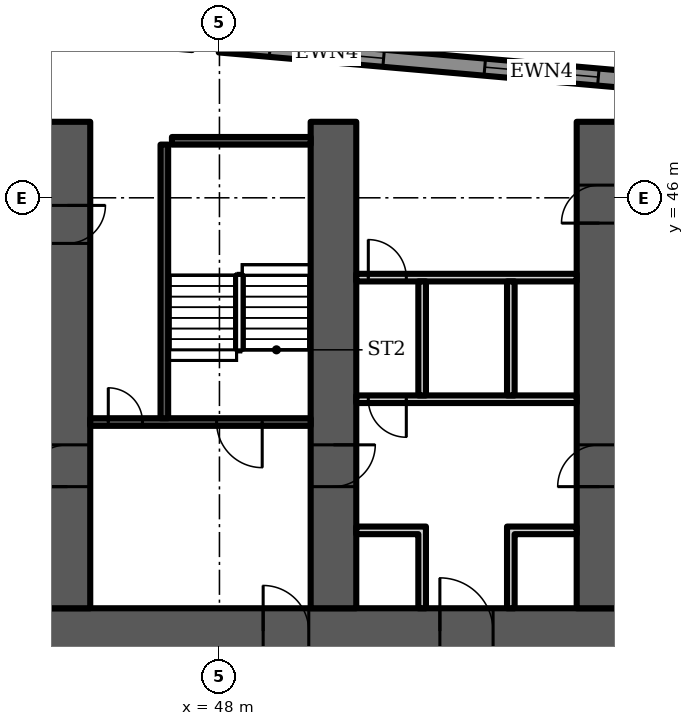
"""IFC4 building model, lengths in metres.
Left out: names, types, materials, properties, quantities, classifications, styles, units other than length and angle.
Written with IfcOpenShell. Run it as: python <this file> out.ifc"""

import sys

from ifc_helpers import new_model, si_unit, direction, frame, frame_2d, origin, place, context, subcontext, project, spatial, polyline, rectangle, outline, extrude, element, fill, save


model = new_model("IFC4")
c1 = context("Model", 3, precision=1e-05, world=origin(), true_north=direction((0.0, 1.0)))
c2 = subcontext(c1, "Body", "Model", "MODEL_VIEW")
j1 = project(units=[si_unit("LENGTHUNIT", "METRE"), si_unit("PLANEANGLEUNIT", "RADIAN")], contexts=[c1])
p1 = place(None, origin())
s1 = spatial("IfcSite", under=j1, at=p1, CompositionType="ELEMENT")
p2 = place(p1, origin())
s2 = spatial("IfcBuilding", under=s1, at=p2, CompositionType="ELEMENT")
p3 = place(p2, frame((0.0, 0.0, 27.5)))
s3 = spatial("IfcBuildingStorey", under=s2, at=p3, CompositionType="ELEMENT", Elevation=27.5)
p4 = place(p3, frame((59.301, 49.06, 0.0), z_axis=(0.0, 0.0, 1.0), x_axis=(-0.996195, 0.087145, 0.0)))
e1 = element("IfcWall", 1, at=p4, inside=s3, PredefinedType="SOLIDWALL", context=c2, shape_type="SweptSolid", body=[
    extrude(rectangle(XDim=11.344, YDim=0.45, at=frame_2d((5.672, 0.0))), origin(), (0.0, 0.0, 1.0), 5.2),
])
p5 = place(p4, frame((1.336, 0.0, 1.0)))
e2 = element("IfcOpeningElement", 2, at=p5, cuts=e1, PredefinedType="OPENING", context=c2, shape_type="SweptSolid", body=[
    extrude(rectangle(XDim=3.0, YDim=3.2, at=frame_2d((1.5, 1.6))), frame((0.0, 0.235, 0.0), z_axis=(0.0, -1.0, 0.0), x_axis=(1.0, 0.0, 0.0)), (0.0, 0.0, 1.0), 0.47),
])
p6 = place(p4, frame((7.008, 0.0, 1.0)))
e3 = element("IfcOpeningElement", 3, at=p6, cuts=e1, PredefinedType="OPENING", context=c2, shape_type="SweptSolid", body=[
    extrude(rectangle(XDim=3.0, YDim=3.2, at=frame_2d((1.5, 1.6))), frame((0.0, 0.235, 0.0), z_axis=(0.0, -1.0, 0.0), x_axis=(1.0, 0.0, 0.0)), (0.0, 0.0, 1.0), 0.47),
])
p7 = place(p3, frame((9.0, 34.6, 0.0), z_axis=(0.0, 0.0, 1.0), x_axis=(1.0, 0.0, 0.0)))
e4 = element("IfcWall", 4, at=p7, inside=s3, PredefinedType="SHEAR", context=c2, shape_type="SweptSolid", body=[
    extrude(rectangle(XDim=56.0, YDim=1.2, at=frame_2d((28.0, 0.0))), origin(), (0.0, 0.0, 1.0), 5.2),
])
p8 = place(p7, frame((3.3, 0.0, 0.0)))
e5 = element("IfcOpeningElement", 5, at=p8, cuts=e4, PredefinedType="OPENING", context=c2, shape_type="SweptSolid", body=[
    extrude(rectangle(XDim=1.0, YDim=2.1, at=frame_2d((0.5, 1.05))), frame((0.0, 0.61, 0.0), z_axis=(0.0, -1.0, 0.0), x_axis=(1.0, 0.0, 0.0)), (0.0, 0.0, 1.0), 1.22),
])
p9 = place(p7, frame((7.867, 0.0, 0.0)))
e6 = element("IfcOpeningElement", 6, at=p9, cuts=e4, PredefinedType="OPENING", context=c2, shape_type="SweptSolid", body=[
    extrude(rectangle(XDim=1.1, YDim=2.1, at=frame_2d((0.55, 1.05))), frame((0.0, 0.61, 0.0), z_axis=(0.0, -1.0, 0.0), x_axis=(1.0, 0.0, 0.0)), (0.0, 0.0, 1.0), 1.22),
])
p10 = place(p7, frame((12.033, 0.0, 0.0)))
e7 = element("IfcOpeningElement", 7, at=p10, cuts=e4, PredefinedType="OPENING", context=c2, shape_type="SweptSolid", body=[
    extrude(rectangle(XDim=1.1, YDim=2.1, at=frame_2d((0.55, 1.05))), frame((0.0, 0.61, 0.0), z_axis=(0.0, -1.0, 0.0), x_axis=(1.0, 0.0, 0.0)), (0.0, 0.0, 1.0), 1.22),
])
p11 = place(p7, frame((9.8, 0.0, 0.0)))
e8 = element("IfcOpeningElement", 8, at=p11, cuts=e4, PredefinedType="OPENING", context=c2, shape_type="SweptSolid", body=[
    extrude(rectangle(XDim=1.4, YDim=2.1, at=frame_2d((0.7, 1.05))), frame((0.0, 0.61, 0.0), z_axis=(0.0, -1.0, 0.0), x_axis=(1.0, 0.0, 0.0)), (0.0, 0.0, 1.0), 1.22),
])
p12 = place(p7, frame((14.65, 0.0, 0.0)))
e9 = element("IfcOpeningElement", 9, at=p12, cuts=e4, PredefinedType="OPENING", context=c2, shape_type="SweptSolid", body=[
    extrude(rectangle(XDim=1.2, YDim=2.1, at=frame_2d((0.6, 1.05))), frame((0.0, 0.61, 0.0), z_axis=(0.0, -1.0, 0.0), x_axis=(1.0, 0.0, 0.0)), (0.0, 0.0, 1.0), 1.22),
])
p13 = place(p7, frame((21.867, 0.0, 0.0)))
e10 = element("IfcOpeningElement", 10, at=p13, cuts=e4, PredefinedType="OPENING", context=c2, shape_type="SweptSolid", body=[
    extrude(rectangle(XDim=1.1, YDim=2.1, at=frame_2d((0.55, 1.05))), frame((0.0, 0.61, 0.0), z_axis=(0.0, -1.0, 0.0), x_axis=(1.0, 0.0, 0.0)), (0.0, 0.0, 1.0), 1.22),
])
p14 = place(p7, frame((26.033, 0.0, 0.0)))
e11 = element("IfcOpeningElement", 11, at=p14, cuts=e4, PredefinedType="OPENING", context=c2, shape_type="SweptSolid", body=[
    extrude(rectangle(XDim=1.1, YDim=2.1, at=frame_2d((0.55, 1.05))), frame((0.0, 0.61, 0.0), z_axis=(0.0, -1.0, 0.0), x_axis=(1.0, 0.0, 0.0)), (0.0, 0.0, 1.0), 1.22),
])
p15 = place(p7, frame((23.8, 0.0, 0.0)))
e12 = element("IfcOpeningElement", 12, at=p15, cuts=e4, PredefinedType="OPENING", context=c2, shape_type="SweptSolid", body=[
    extrude(rectangle(XDim=1.4, YDim=2.1, at=frame_2d((0.7, 1.05))), frame((0.0, 0.61, 0.0), z_axis=(0.0, -1.0, 0.0), x_axis=(1.0, 0.0, 0.0)), (0.0, 0.0, 1.0), 1.22),
])
p16 = place(p7, frame((28.867, 0.0, 0.0)))
e13 = element("IfcOpeningElement", 13, at=p16, cuts=e4, PredefinedType="OPENING", context=c2, shape_type="SweptSolid", body=[
    extrude(rectangle(XDim=1.1, YDim=2.1, at=frame_2d((0.55, 1.05))), frame((0.0, 0.61, 0.0), z_axis=(0.0, -1.0, 0.0), x_axis=(1.0, 0.0, 0.0)), (0.0, 0.0, 1.0), 1.22),
])
p17 = place(p7, frame((33.033, 0.0, 0.0)))
e14 = element("IfcOpeningElement", 14, at=p17, cuts=e4, PredefinedType="OPENING", context=c2, shape_type="SweptSolid", body=[
    extrude(rectangle(XDim=1.1, YDim=2.1, at=frame_2d((0.55, 1.05))), frame((0.0, 0.61, 0.0), z_axis=(0.0, -1.0, 0.0), x_axis=(1.0, 0.0, 0.0)), (0.0, 0.0, 1.0), 1.22),
])
p18 = place(p7, frame((40.15, 0.0, 0.0)))
e15 = element("IfcOpeningElement", 15, at=p18, cuts=e4, PredefinedType="OPENING", context=c2, shape_type="SweptSolid", body=[
    extrude(rectangle(XDim=1.2, YDim=2.1, at=frame_2d((0.6, 1.05))), frame((0.0, 0.61, 0.0), z_axis=(0.0, -1.0, 0.0), x_axis=(1.0, 0.0, 0.0)), (0.0, 0.0, 1.0), 1.22),
])
p19 = place(p7, frame((44.8, 0.0, 0.0)))
e16 = element("IfcOpeningElement", 16, at=p19, cuts=e4, PredefinedType="OPENING", context=c2, shape_type="SweptSolid", body=[
    extrude(rectangle(XDim=1.4, YDim=2.1, at=frame_2d((0.7, 1.05))), frame((0.0, 0.61, 0.0), z_axis=(0.0, -1.0, 0.0), x_axis=(1.0, 0.0, 0.0)), (0.0, 0.0, 1.0), 1.22),
])
p20 = place(p7, frame((49.867, 0.0, 0.0)))
e17 = element("IfcOpeningElement", 17, at=p20, cuts=e4, PredefinedType="OPENING", context=c2, shape_type="SweptSolid", body=[
    extrude(rectangle(XDim=1.1, YDim=2.1, at=frame_2d((0.55, 1.05))), frame((0.0, 0.61, 0.0), z_axis=(0.0, -1.0, 0.0), x_axis=(1.0, 0.0, 0.0)), (0.0, 0.0, 1.0), 1.22),
])
p21 = place(p7, frame((53.5, 0.0, 0.0)))
e18 = element("IfcOpeningElement", 18, at=p21, cuts=e4, PredefinedType="OPENING", context=c2, shape_type="SweptSolid", body=[
    extrude(rectangle(XDim=1.1, YDim=2.1, at=frame_2d((0.55, 1.05))), frame((0.0, 0.61, 0.0), z_axis=(0.0, -1.0, 0.0), x_axis=(1.0, 0.0, 0.0)), (0.0, 0.0, 1.0), 1.22),
])
p22 = place(p7, frame((51.567, 0.0, 0.0)))
e19 = element("IfcOpeningElement", 19, at=p22, cuts=e4, PredefinedType="OPENING", context=c2, shape_type="SweptSolid", body=[
    extrude(rectangle(XDim=1.4, YDim=2.1, at=frame_2d((0.7, 1.05))), frame((0.0, 0.61, 0.0), z_axis=(0.0, -1.0, 0.0), x_axis=(1.0, 0.0, 0.0)), (0.0, 0.0, 1.0), 1.22),
])
p23 = place(p3, frame((44.0, 35.2, 0.0), z_axis=(0.0, 0.0, 1.0), x_axis=(0.0, 1.0, 0.0)))
e20 = element("IfcWall", 20, at=p23, inside=s3, PredefinedType="SHEAR", context=c2, shape_type="SweptSolid", body=[
    extrude(rectangle(XDim=12.8, YDim=1.2, at=frame_2d((6.4, 0.0))), origin(), (0.0, 0.0, 1.0), 5.2),
])
p24 = place(p23, frame((3.2, 0.0, 0.0)))
e21 = element("IfcOpeningElement", 21, at=p24, cuts=e20, PredefinedType="OPENING", context=c2, shape_type="SweptSolid", body=[
    extrude(rectangle(XDim=1.1, YDim=2.1, at=frame_2d((0.55, 1.05))), frame((0.0, 0.61, 0.0), z_axis=(0.0, -1.0, 0.0), x_axis=(1.0, 0.0, 0.0)), (0.0, 0.0, 1.0), 1.22),
])
p25 = place(p23, frame((9.6, 0.0, 0.0)))
e22 = element("IfcOpeningElement", 22, at=p25, cuts=e20, PredefinedType="OPENING", context=c2, shape_type="SweptSolid", body=[
    extrude(rectangle(XDim=1.0, YDim=2.1, at=frame_2d((0.5, 1.05))), frame((0.0, 0.61, 0.0), z_axis=(0.0, -1.0, 0.0), x_axis=(1.0, 0.0, 0.0)), (0.0, 0.0, 1.0), 1.22),
])
p26 = place(p3, frame((51.0, 35.2, 0.0), z_axis=(0.0, 0.0, 1.0), x_axis=(0.0, 1.0, 0.0)))
e23 = element("IfcWall", 23, at=p26, inside=s3, PredefinedType="SHEAR", context=c2, shape_type="SweptSolid", body=[
    extrude(rectangle(XDim=12.8, YDim=1.2, at=frame_2d((6.4, 0.0))), origin(), (0.0, 0.0, 1.0), 5.2),
])
p27 = place(p26, frame((3.2, 0.0, 0.0)))
e24 = element("IfcOpeningElement", 24, at=p27, cuts=e23, PredefinedType="OPENING", context=c2, shape_type="SweptSolid", body=[
    extrude(rectangle(XDim=1.1, YDim=2.1, at=frame_2d((0.55, 1.05))), frame((0.0, 0.61, 0.0), z_axis=(0.0, -1.0, 0.0), x_axis=(1.0, 0.0, 0.0)), (0.0, 0.0, 1.0), 1.22),
])
p28 = place(p3, frame((58.0, 35.2, 0.0), z_axis=(0.0, 0.0, 1.0), x_axis=(0.0, 1.0, 0.0)))
e25 = element("IfcWall", 25, at=p28, inside=s3, PredefinedType="SHEAR", context=c2, shape_type="SweptSolid", body=[
    extrude(rectangle(XDim=12.8, YDim=1.2, at=frame_2d((6.4, 0.0))), origin(), (0.0, 0.0, 1.0), 5.2),
])
p29 = place(p28, frame((10.134, 0.0, 0.0)))
e26 = element("IfcOpeningElement", 26, at=p29, cuts=e25, PredefinedType="OPENING", context=c2, shape_type="SweptSolid", body=[
    extrude(rectangle(XDim=1.0, YDim=2.1, at=frame_2d((0.5, 1.05))), frame((0.0, 0.61, 0.0), z_axis=(0.0, -1.0, 0.0), x_axis=(1.0, 0.0, 0.0)), (0.0, 0.0, 1.0), 1.22),
])
p30 = place(p28, frame((3.2, 0.0, 0.0)))
e27 = element("IfcOpeningElement", 27, at=p30, cuts=e25, PredefinedType="OPENING", context=c2, shape_type="SweptSolid", body=[
    extrude(rectangle(XDim=1.1, YDim=2.1, at=frame_2d((0.55, 1.05))), frame((0.0, 0.61, 0.0), z_axis=(0.0, -1.0, 0.0), x_axis=(1.0, 0.0, 0.0)), (0.0, 0.0, 1.0), 1.22),
])
p31 = place(p3, frame((44.6, 40.1, 0.0), z_axis=(0.0, 0.0, 1.0), x_axis=(1.0, 0.0, 0.0)))
e28 = element("IfcWall", 28, at=p31, inside=s3, PredefinedType="SHEAR", context=c2, shape_type="SweptSolid", body=[
    extrude(rectangle(XDim=5.8, YDim=0.2, at=frame_2d((2.9, 0.0))), origin(), (0.0, 0.0, 1.0), 5.2),
])
p32 = place(p31, frame((3.325, 0.0, 0.0)))
e29 = element("IfcOpeningElement", 29, at=p32, cuts=e28, PredefinedType="OPENING", context=c2, shape_type="SweptSolid", body=[
    extrude(rectangle(XDim=1.2, YDim=2.1, at=frame_2d((0.6, 1.05))), frame((0.0, 0.11, 0.0), z_axis=(0.0, -1.0, 0.0), x_axis=(1.0, 0.0, 0.0)), (0.0, 0.0, 1.0), 0.22),
])
p33 = place(p31, frame((0.475, 0.0, 0.0)))
e30 = element("IfcOpeningElement", 30, at=p33, cuts=e28, PredefinedType="OPENING", context=c2, shape_type="SweptSolid", body=[
    extrude(rectangle(XDim=0.9, YDim=2.1, at=frame_2d((0.45, 1.05))), frame((0.0, 0.11, 0.0), z_axis=(0.0, -1.0, 0.0), x_axis=(1.0, 0.0, 0.0)), (0.0, 0.0, 1.0), 0.22),
])
p34 = place(p3, frame((46.55, 40.2, 0.0), z_axis=(0.0, 0.0, 1.0), x_axis=(0.0, 1.0, 0.0)))
e31 = element("IfcWall", 31, at=p34, inside=s3, PredefinedType="SHEAR", context=c2, shape_type="SweptSolid", body=[
    extrude(rectangle(XDim=7.2, YDim=0.2, at=frame_2d((3.6, 0.0))), origin(), (0.0, 0.0, 1.0), 5.2),
])
p35 = place(p3, frame((46.75, 47.5, 0.0), z_axis=(0.0, 0.0, 1.0), x_axis=(1.0, 0.0, 0.0)))
e32 = element("IfcWall", 32, at=p35, inside=s3, PredefinedType="SHEAR", context=c2, shape_type="SweptSolid", body=[
    extrude(rectangle(XDim=3.65, YDim=0.2, at=frame_2d((1.825, 0.0))), origin(), (0.0, 0.0, 1.0), 5.2),
])
p36 = place(p3, frame((51.6, 40.7, 0.0), z_axis=(0.0, 0.0, 1.0), x_axis=(1.0, 0.0, 0.0)))
e33 = element("IfcWall", 33, at=p36, inside=s3, PredefinedType="PARTITIONING", context=c2, shape_type="SweptSolid", body=[
    extrude(rectangle(XDim=5.8, YDim=0.2, at=frame_2d((2.9, 0.0))), origin(), (0.0, 0.0, 1.0), 5.2),
])
p37 = place(p36, frame((0.317, 0.0, 0.0)))
e34 = element("IfcOpeningElement", 34, at=p37, cuts=e33, PredefinedType="OPENING", context=c2, shape_type="SweptSolid", body=[
    extrude(rectangle(XDim=1.0, YDim=2.1, at=frame_2d((0.5, 1.05))), frame((0.0, 0.11, 0.0), z_axis=(0.0, -1.0, 0.0), x_axis=(1.0, 0.0, 0.0)), (0.0, 0.0, 1.0), 0.22),
])
p38 = place(p3, frame((51.6, 43.9, 0.0), z_axis=(0.0, 0.0, 1.0), x_axis=(1.0, 0.0, 0.0)))
e35 = element("IfcWall", 35, at=p38, inside=s3, PredefinedType="PARTITIONING", context=c2, shape_type="SweptSolid", body=[
    extrude(rectangle(XDim=5.8, YDim=0.2, at=frame_2d((2.9, 0.0))), origin(), (0.0, 0.0, 1.0), 5.2),
])
p39 = place(p38, frame((0.317, 0.0, 0.0)))
e36 = element("IfcOpeningElement", 36, at=p39, cuts=e35, PredefinedType="OPENING", context=c2, shape_type="SweptSolid", body=[
    extrude(rectangle(XDim=1.0, YDim=2.1, at=frame_2d((0.5, 1.05))), frame((0.0, 0.11, 0.0), z_axis=(0.0, -1.0, 0.0), x_axis=(1.0, 0.0, 0.0)), (0.0, 0.0, 1.0), 0.22),
])
p40 = place(p3, frame((0.0, 0.0, -0.0)))
e37 = element("IfcWall", 37, at=p40, inside=s3, PredefinedType="PARTITIONING", context=c2, shape_type="SweptSolid", body=[
    extrude(outline(polyline([(53.233, 37.15), (51.6, 37.15), (51.6, 37.35), (53.233, 37.35), (53.433, 37.35), (53.433, 35.2), (53.233, 35.2), (53.233, 37.15)])), origin(), (0.0, 0.0, 1.0), 5.2),
])
p41 = place(p3, frame((0.0, 0.0, -0.0)))
e38 = element("IfcWall", 38, at=p41, inside=s3, PredefinedType="PARTITIONING", context=c2, shape_type="SweptSolid", body=[
    extrude(outline(polyline([(55.567, 37.35), (55.767, 37.35), (57.4, 37.35), (57.4, 37.15), (55.767, 37.15), (55.767, 35.2), (55.567, 35.2), (55.567, 37.35)])), origin(), (0.0, 0.0, 1.0), 5.2),
])
p42 = place(p3, frame((0.0, 0.0, -0.0)))
e39 = element("IfcWall", 39, at=p42, inside=s3, PredefinedType="PARTITIONING", context=c2, shape_type="SweptSolid", body=[
    extrude(outline(polyline([(53.233, 40.8), (53.233, 43.8), (53.433, 43.8), (53.433, 40.8), (53.233, 40.8)])), origin(), (0.0, 0.0, 1.0), 5.2),
])
p43 = place(p3, frame((0.0, 0.0, -0.0)))
e40 = element("IfcWall", 40, at=p43, inside=s3, PredefinedType="PARTITIONING", context=c2, shape_type="SweptSolid", body=[
    extrude(outline(polyline([(55.567, 40.8), (55.567, 43.8), (55.767, 43.8), (55.767, 40.8), (55.567, 40.8)])), origin(), (0.0, 0.0, 1.0), 5.2),
])
p44 = place(p5, origin())
e41 = element("IfcWindow", 41, at=p44, inside=s3, PartitioningType="SINGLE_PANEL", PredefinedType="WINDOW", context=c2, shape_type="SweptSolid", body=[
    extrude(rectangle(XDim=3.0, YDim=3.2, at=frame_2d((1.5, 1.6))), frame((0.0, 0.105, 0.0), z_axis=(0.0, -1.0, 0.0), x_axis=(1.0, 0.0, 0.0)), (0.0, 0.0, 1.0), 0.06),
])
fill(e2, e41)
p45 = place(p6, origin())
e42 = element("IfcWindow", 42, at=p45, inside=s3, PartitioningType="SINGLE_PANEL", PredefinedType="WINDOW", context=c2, shape_type="SweptSolid", body=[
    extrude(rectangle(XDim=3.0, YDim=3.2, at=frame_2d((1.5, 1.6))), frame((0.0, 0.105, 0.0), z_axis=(0.0, -1.0, 0.0), x_axis=(1.0, 0.0, 0.0)), (0.0, 0.0, 1.0), 0.06),
])
fill(e3, e42)
p46 = place(p32, origin())
e43 = element("IfcDoor", 43, at=p46, inside=s3, OperationType="SINGLE_SWING_RIGHT", PredefinedType="DOOR", context=c2, shape_type="SweptSolid", body=[
    extrude(rectangle(XDim=1.2, YDim=2.1, at=frame_2d((0.6, 1.05))), frame((0.0, 0.025, 0.0), z_axis=(0.0, -1.0, 0.0), x_axis=(1.0, 0.0, 0.0)), (0.0, 0.0, 1.0), 0.05),
])
fill(e29, e43)
p47 = place(p33, origin())
e44 = element("IfcDoor", 44, at=p47, inside=s3, OperationType="SINGLE_SWING_LEFT", PredefinedType="DOOR", context=c2, shape_type="SweptSolid", body=[
    extrude(rectangle(XDim=0.9, YDim=2.1, at=frame_2d((0.45, 1.05))), frame((0.0, 0.025, 0.0), z_axis=(0.0, -1.0, 0.0), x_axis=(1.0, 0.0, 0.0)), (0.0, 0.0, 1.0), 0.05),
])
fill(e30, e44)
p48 = place(p18, origin())
e45 = element("IfcDoor", 45, at=p48, inside=s3, OperationType="SINGLE_SWING_LEFT", PredefinedType="DOOR", context=c2, shape_type="SweptSolid", body=[
    extrude(rectangle(XDim=1.2, YDim=2.1, at=frame_2d((0.6, 1.05))), frame((0.0, 0.025, 0.0), z_axis=(0.0, -1.0, 0.0), x_axis=(1.0, 0.0, 0.0)), (0.0, 0.0, 1.0), 0.05),
])
fill(e15, e45)
p49 = place(p19, origin())
e46 = element("IfcDoor", 46, at=p49, inside=s3, OperationType="DOUBLE_DOOR_SINGLE_SWING", PredefinedType="DOOR", context=c2, shape_type="SweptSolid", body=[
    extrude(rectangle(XDim=1.4, YDim=2.1, at=frame_2d((0.7, 1.05))), frame((0.0, 0.025, 0.0), z_axis=(0.0, -1.0, 0.0), x_axis=(1.0, 0.0, 0.0)), (0.0, 0.0, 1.0), 0.05),
])
fill(e16, e46)
p50 = place(p37, origin())
e47 = element("IfcDoor", 47, at=p50, inside=s3, OperationType="SINGLE_SWING_RIGHT", PredefinedType="DOOR", context=c2, shape_type="SweptSolid", body=[
    extrude(rectangle(XDim=1.0, YDim=2.1, at=frame_2d((0.5, 1.05))), frame((0.0, 0.025, 0.0), z_axis=(0.0, -1.0, 0.0), x_axis=(1.0, 0.0, 0.0)), (0.0, 0.0, 1.0), 0.05),
])
fill(e34, e47)
p51 = place(p39, origin())
e48 = element("IfcDoor", 48, at=p51, inside=s3, OperationType="SINGLE_SWING_LEFT", PredefinedType="DOOR", context=c2, shape_type="SweptSolid", body=[
    extrude(rectangle(XDim=1.0, YDim=2.1, at=frame_2d((0.5, 1.05))), frame((0.0, 0.025, 0.0), z_axis=(0.0, -1.0, 0.0), x_axis=(1.0, 0.0, 0.0)), (0.0, 0.0, 1.0), 0.05),
])
fill(e36, e48)
p52 = place(p29, origin())
e49 = element("IfcDoor", 49, at=p52, inside=s3, OperationType="SINGLE_SWING_LEFT", PredefinedType="DOOR", context=c2, shape_type="SweptSolid", body=[
    extrude(rectangle(XDim=1.0, YDim=2.1, at=frame_2d((0.5, 1.05))), frame((0.0, 0.6, 0.0), z_axis=(0.0, -1.0, 0.0), x_axis=(1.0, 0.0, 0.0)), (0.0, 0.0, 1.0), 1.199),
])
fill(e26, e49)
p53 = place(p24, origin())
e50 = element("IfcDoor", 50, at=p53, inside=s3, OperationType="SINGLE_SWING_LEFT", PredefinedType="DOOR", context=c2, shape_type="SweptSolid", body=[
    extrude(rectangle(XDim=1.1, YDim=2.1, at=frame_2d((0.55, 1.05))), frame((0.0, 0.025, 0.0), z_axis=(0.0, -1.0, 0.0), x_axis=(1.0, 0.0, 0.0)), (0.0, 0.0, 1.0), 0.05),
])
fill(e21, e50)
p54 = place(p25, origin())
e51 = element("IfcDoor", 51, at=p54, inside=s3, OperationType="SINGLE_SWING_RIGHT", PredefinedType="DOOR", context=c2, shape_type="SweptSolid", body=[
    extrude(rectangle(XDim=1.0, YDim=2.1, at=frame_2d((0.5, 1.05))), frame((0.0, 0.6, 0.0), z_axis=(0.0, -1.0, 0.0), x_axis=(1.0, 0.0, 0.0)), (0.0, 0.0, 1.0), 1.199),
])
fill(e22, e51)
p55 = place(p27, origin())
e52 = element("IfcDoor", 52, at=p55, inside=s3, OperationType="SINGLE_SWING_RIGHT", PredefinedType="DOOR", context=c2, shape_type="SweptSolid", body=[
    extrude(rectangle(XDim=1.1, YDim=2.1, at=frame_2d((0.55, 1.05))), frame((0.0, 0.025, 0.0), z_axis=(0.0, -1.0, 0.0), x_axis=(1.0, 0.0, 0.0)), (0.0, 0.0, 1.0), 0.05),
])
fill(e24, e52)
p56 = place(p30, origin())
e53 = element("IfcDoor", 53, at=p56, inside=s3, OperationType="SINGLE_SWING_LEFT", PredefinedType="DOOR", context=c2, shape_type="SweptSolid", body=[
    extrude(rectangle(XDim=1.1, YDim=2.1, at=frame_2d((0.55, 1.05))), frame((0.0, 0.025, 0.0), z_axis=(0.0, -1.0, 0.0), x_axis=(1.0, 0.0, 0.0)), (0.0, 0.0, 1.0), 0.05),
])
fill(e27, e53)
save(model, sys.argv[1])
